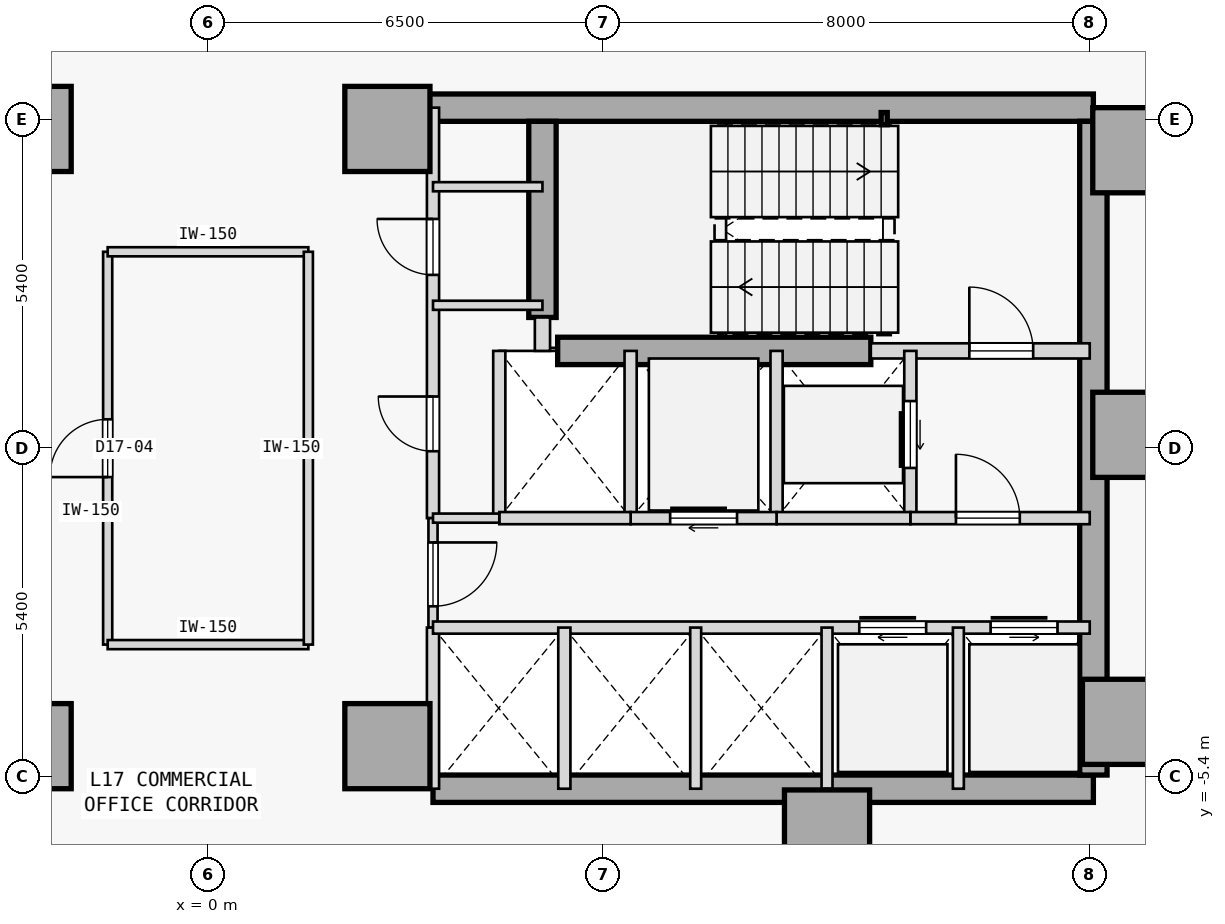
"""IFC4 building model, lengths in metres.
Left out: names, types, materials, properties, quantities, classifications, styles, units other than length and angle.
Written with IfcOpenShell. Run it as: python <this file> out.ifc"""

import sys

from ifc_helpers import new_model, si_unit, direction, frame, frame_2d, origin, origin_2d, place, context, subcontext, project, spatial, rectangle, hollow_rectangle, extrude, element, fill, save


model = new_model("IFC4")
c1 = context("Model", 3, precision=1e-05, world=origin(), true_north=direction((0.0, 1.0)))
c2 = subcontext(c1, "Body", "Model", "MODEL_VIEW")
j1 = project(units=[si_unit("LENGTHUNIT", "METRE"), si_unit("PLANEANGLEUNIT", "RADIAN")], contexts=[c1])
p1 = place(None, origin())
s1 = spatial("IfcSite", under=j1, at=p1, CompositionType="ELEMENT")
p2 = place(p1, origin())
s2 = spatial("IfcBuilding", under=s1, at=p2, CompositionType="ELEMENT")
p3 = place(p2, frame((0.0, 0.0, 71.2)))
s3 = spatial("IfcBuildingStorey", under=s2, at=p3, CompositionType="ELEMENT", Elevation=71.2)
for number, where, z_axis, x_axis in (
    (1, (-2.95, -4.9, 0.0), (0.0, 0.0, 1.0), (1.0, 0.0, 0.0)),
    (2, (-2.95, 5.25, 0.0), (0.0, 0.0, 1.0), (1.0, 0.0, 0.0)),
    (3, (15.25, 4.9, 0.0), (0.0, 0.0, 1.0), (1.0, 0.0, 0.0)),
    (4, (15.25, 0.22, 0.0), (0.0, 0.0, 1.0), (1.0, 0.0, 0.0)),
    (5, (15.08, -4.5, 0.0), (0.0, 0.0, 1.0), (1.0, 0.0, 0.0)),
    (6, (10.18, -6.32, 0.0), (0.0, 0.0, 1.0), (1.0, 0.0, 0.0)),
    (7, (2.95, -4.9, 0.0), (0.0, 0.0, 1.0), (1.0, 0.0, 0.0)),
    (8, (2.95, 5.25, 0.0), (0.0, 0.0, 1.0), (1.0, 0.0, 0.0)),
):
    element("IfcColumn", number, at=place(p3, frame(where, z_axis=z_axis, x_axis=x_axis)), inside=s3, PredefinedType="COLUMN", context=c2, shape_type="SweptSolid", body=[
        extrude(rectangle(XDim=1.4, YDim=1.4, at=origin_2d()), origin(), (0.0, 0.0, 1.0), 3.8),
    ])
p4 = place(p3, frame((3.15, 5.6, 0.0), z_axis=(0.0, 0.0, 1.0), x_axis=(1.0, 0.0, 0.0)))
e9 = element("IfcWall", 9, at=p4, inside=s3, PredefinedType="SHEAR", context=c2, shape_type="SweptSolid", body=[
    extrude(rectangle(XDim=11.41, YDim=0.45, at=frame_2d((5.705, 0.0))), origin(), (0.0, 0.0, 1.0), 3.575),
])
p5 = place(p3, frame((3.7, -5.6, 0.0), z_axis=(0.0, 0.0, 1.0), x_axis=(1.0, 0.0, 0.0)))
e10 = element("IfcWall", 10, at=p5, inside=s3, PredefinedType="SHEAR", context=c2, shape_type="SweptSolid", body=[
    extrude(rectangle(XDim=10.86, YDim=0.45, at=frame_2d((5.43, 0.0))), origin(), (0.0, 0.0, 1.0), 3.575),
])
p6 = place(p3, frame((14.56, -5.375, 0.0), z_axis=(0.0, 0.0, 1.0), x_axis=(0.0, 1.0, 0.0)))
e11 = element("IfcWall", 11, at=p6, inside=s3, PredefinedType="SHEAR", context=c2, shape_type="SweptSolid", body=[
    extrude(rectangle(XDim=10.75, YDim=0.45, at=frame_2d((5.375, 0.0))), origin(), (0.0, 0.0, 1.0), 3.575),
])
p7 = place(p3, frame((5.5, 2.15, 0.0), z_axis=(0.0, 0.0, 1.0), x_axis=(0.0, 1.0, 0.0)))
e12 = element("IfcWall", 12, at=p7, inside=s3, PredefinedType="SHEAR", context=c2, shape_type="SweptSolid", body=[
    extrude(rectangle(XDim=3.225, YDim=0.45, at=frame_2d((1.613, 0.0))), origin(), (0.0, 0.0, 1.0), 3.575),
])
p8 = place(p3, frame((5.75, 1.6, 0.0), z_axis=(0.0, 0.0, 1.0), x_axis=(1.0, 0.0, 0.0)))
e13 = element("IfcWall", 13, at=p8, inside=s3, PredefinedType="SHEAR", context=c2, shape_type="SweptSolid", body=[
    extrude(rectangle(XDim=5.15, YDim=0.45, at=frame_2d((2.575, 0.0))), origin(), (0.0, 0.0, 1.0), 3.575),
])
p9 = place(p3, frame((11.12, 5.42, 0.0), z_axis=(0.0, 0.0, 1.0), x_axis=(1.0, 0.0, 0.0)))
e14 = element("IfcColumn", 14, at=p9, inside=s3, PredefinedType="COLUMN", context=c2, shape_type="SweptSolid", body=[
    extrude(hollow_rectangle(XDim=0.1, YDim=0.2, WallThickness=0.008, at=origin_2d()), origin(), (0.0, 0.0, 1.0), 3.8),
])
p10 = place(p3, frame((10.9, 1.6, 0.0), z_axis=(0.0, 0.0, 1.0), x_axis=(1.0, 0.0, 0.0)))
e15 = element("IfcWall", 15, at=p10, inside=s3, PredefinedType="STANDARD", context=c2, shape_type="SweptSolid", body=[
    extrude(rectangle(XDim=3.6, YDim=0.25, at=frame_2d((1.8, 0.0))), origin(), (0.0, 0.0, 1.0), 3.575),
])
p11 = place(p10, frame((1.62, 0.0, 0.0)))
e16 = element("IfcOpeningElement", 16, at=p11, cuts=e15, PredefinedType="OPENING", context=c2, shape_type="SweptSolid", body=[
    extrude(rectangle(XDim=1.05, YDim=2.15, at=frame_2d((0.525, 1.075))), frame((0.0, 0.135, 0.0), z_axis=(0.0, -1.0, 0.0), x_axis=(1.0, 0.0, 0.0)), (0.0, 0.0, 1.0), 0.27),
])
p12 = place(p3, frame((5.5, 1.6, 0.0), z_axis=(0.0, 0.0, 1.0), x_axis=(0.0, 1.0, 0.0)))
e17 = element("IfcWall", 17, at=p12, inside=s3, PredefinedType="STANDARD", context=c2, shape_type="SweptSolid", body=[
    extrude(rectangle(XDim=0.55, YDim=0.25, at=frame_2d((0.275, 0.0))), origin(), (0.0, 0.0, 1.0), 3.575),
])
p13 = place(p3, frame((3.7, -1.15, 0.0), z_axis=(0.0, 0.0, 1.0), x_axis=(0.0, 1.0, 0.0)))
e18 = element("IfcWall", 18, at=p13, inside=s3, PredefinedType="STANDARD", context=c2, shape_type="SweptSolid", body=[
    extrude(rectangle(XDim=6.75, YDim=0.2, at=frame_2d((3.375, 0.0))), origin(), (0.0, 0.0, 1.0), 3.575),
])
p14 = place(p13, frame((1.1, 0.0, 0.0)))
e19 = element("IfcOpeningElement", 19, at=p14, cuts=e18, PredefinedType="OPENING", context=c2, shape_type="SweptSolid", body=[
    extrude(rectangle(XDim=0.9, YDim=2.15, at=frame_2d((0.45, 1.075))), frame((0.0, 0.11, 0.0), z_axis=(0.0, -1.0, 0.0), x_axis=(1.0, 0.0, 0.0)), (0.0, 0.0, 1.0), 0.22),
])
p15 = place(p13, frame((4.0, 0.0, 0.0)))
e20 = element("IfcOpeningElement", 20, at=p15, cuts=e18, PredefinedType="OPENING", context=c2, shape_type="SweptSolid", body=[
    extrude(rectangle(XDim=0.92, YDim=2.15, at=frame_2d((0.46, 1.075))), frame((0.0, 0.11, 0.0), z_axis=(0.0, -1.0, 0.0), x_axis=(1.0, 0.0, 0.0)), (0.0, 0.0, 1.0), 0.22),
])
p16 = place(p3, frame((3.7, -2.95, 0.0), z_axis=(0.0, 0.0, 1.0), x_axis=(0.0, 1.0, 0.0)))
e21 = element("IfcWall", 21, at=p16, inside=s3, PredefinedType="PARTITIONING", context=c2, shape_type="SweptSolid", body=[
    extrude(rectangle(XDim=1.8, YDim=0.15, at=frame_2d((0.9, 0.0))), origin(), (0.0, 0.0, 1.0), 3.575),
])
p17 = place(p16, frame((0.35, 0.0, 0.0)))
e22 = element("IfcOpeningElement", 22, at=p17, cuts=e21, PredefinedType="OPENING", context=c2, shape_type="SweptSolid", body=[
    extrude(rectangle(XDim=1.05, YDim=2.18, at=frame_2d((0.525, 1.09))), frame((0.0, 0.085, 0.0), z_axis=(0.0, -1.0, 0.0), x_axis=(1.0, 0.0, 0.0)), (0.0, 0.0, 1.0), 0.17),
])
p18 = place(p3, frame((3.7, -5.6, 0.0), z_axis=(0.0, 0.0, 1.0), x_axis=(0.0, 1.0, 0.0)))
e23 = element("IfcWall", 23, at=p18, inside=s3, PredefinedType="STANDARD", context=c2, shape_type="SweptSolid", body=[
    extrude(rectangle(XDim=2.65, YDim=0.2, at=frame_2d((1.325, 0.0))), origin(), (0.0, 0.0, 1.0), 3.575),
])
p19 = place(p3, frame((11.55, -1.15, 0.0), z_axis=(0.0, 0.0, 1.0), x_axis=(0.0, 1.0, 0.0)))
e24 = element("IfcWall", 24, at=p19, inside=s3, PredefinedType="STANDARD", context=c2, shape_type="SweptSolid", body=[
    extrude(rectangle(XDim=2.75, YDim=0.2, at=frame_2d((1.375, 0.0))), origin(), (0.0, 0.0, 1.0), 3.575),
])
p20 = place(p19, frame((0.825, 0.0, 0.0)))
e25 = element("IfcOpeningElement", 25, at=p20, cuts=e24, PredefinedType="OPENING", context=c2, shape_type="SweptSolid", body=[
    extrude(rectangle(XDim=1.1, YDim=2.15, at=frame_2d((0.55, 1.075))), frame((0.0, 0.11, 0.0), z_axis=(0.0, -1.0, 0.0), x_axis=(1.0, 0.0, 0.0)), (0.0, 0.0, 1.0), 0.22),
])
p21 = place(p3, frame((9.35, -1.15, 0.0), z_axis=(0.0, 0.0, 1.0), x_axis=(0.0, 1.0, 0.0)))
e26 = element("IfcWall", 26, at=p21, inside=s3, PredefinedType="STANDARD", context=c2, shape_type="SweptSolid", body=[
    extrude(rectangle(XDim=2.75, YDim=0.2, at=frame_2d((1.375, 0.0))), origin(), (0.0, 0.0, 1.0), 3.575),
])
p22 = place(p3, frame((11.55, -1.15, 0.0), z_axis=(0.0, 0.0, 1.0), x_axis=(1.0, 0.0, 0.0)))
e27 = element("IfcWall", 27, at=p22, inside=s3, PredefinedType="STANDARD", context=c2, shape_type="SweptSolid", body=[
    extrude(rectangle(XDim=2.95, YDim=0.2, at=frame_2d((1.475, 0.0))), origin(), (0.0, 0.0, 1.0), 3.575),
])
p23 = place(p22, frame((0.75, 0.0, 0.0)))
e28 = element("IfcOpeningElement", 28, at=p23, cuts=e27, PredefinedType="OPENING", context=c2, shape_type="SweptSolid", body=[
    extrude(rectangle(XDim=1.05, YDim=2.18, at=frame_2d((0.525, 1.09))), frame((0.0, 0.11, 0.0), z_axis=(0.0, -1.0, 0.0), x_axis=(1.0, 0.0, 0.0)), (0.0, 0.0, 1.0), 0.22),
])
p24 = place(p3, frame((9.35, -1.15, 0.0), z_axis=(0.0, 0.0, 1.0), x_axis=(1.0, 0.0, 0.0)))
e29 = element("IfcWall", 29, at=p24, inside=s3, PredefinedType="STANDARD", context=c2, shape_type="SweptSolid", body=[
    extrude(rectangle(XDim=2.2, YDim=0.2, at=frame_2d((1.1, 0.0))), origin(), (0.0, 0.0, 1.0), 3.575),
])
p25 = place(p3, frame((6.95, -1.15, 0.0), z_axis=(0.0, 0.0, 1.0), x_axis=(0.0, 1.0, 0.0)))
e30 = element("IfcWall", 30, at=p25, inside=s3, PredefinedType="STANDARD", context=c2, shape_type="SweptSolid", body=[
    extrude(rectangle(XDim=2.75, YDim=0.2, at=frame_2d((1.375, 0.0))), origin(), (0.0, 0.0, 1.0), 3.575),
])
p26 = place(p3, frame((6.95, -1.15, 0.0), z_axis=(0.0, 0.0, 1.0), x_axis=(1.0, 0.0, 0.0)))
e31 = element("IfcWall", 31, at=p26, inside=s3, PredefinedType="STANDARD", context=c2, shape_type="SweptSolid", body=[
    extrude(rectangle(XDim=2.4, YDim=0.2, at=frame_2d((1.2, 0.0))), origin(), (0.0, 0.0, 1.0), 3.575),
])
p27 = place(p26, frame((0.65, 0.0, 0.0)))
e32 = element("IfcOpeningElement", 32, at=p27, cuts=e31, PredefinedType="OPENING", context=c2, shape_type="SweptSolid", body=[
    extrude(rectangle(XDim=1.1, YDim=2.15, at=frame_2d((0.55, 1.075))), frame((0.0, 0.11, 0.0), z_axis=(0.0, -1.0, 0.0), x_axis=(1.0, 0.0, 0.0)), (0.0, 0.0, 1.0), 0.22),
])
p28 = place(p3, frame((4.79, -1.15, 0.0), z_axis=(0.0, 0.0, 1.0), x_axis=(0.0, 1.0, 0.0)))
e33 = element("IfcWall", 33, at=p28, inside=s3, PredefinedType="STANDARD", context=c2, shape_type="SweptSolid", body=[
    extrude(rectangle(XDim=2.75, YDim=0.2, at=frame_2d((1.375, 0.0))), origin(), (0.0, 0.0, 1.0), 3.575),
])
p29 = place(p3, frame((4.79, -1.15, 0.0), z_axis=(0.0, 0.0, 1.0), x_axis=(1.0, 0.0, 0.0)))
e34 = element("IfcWall", 34, at=p29, inside=s3, PredefinedType="STANDARD", context=c2, shape_type="SweptSolid", body=[
    extrude(rectangle(XDim=2.16, YDim=0.2, at=frame_2d((1.08, 0.0))), origin(), (0.0, 0.0, 1.0), 3.575),
])
p30 = place(p3, frame((3.7, -1.15, 0.0), z_axis=(0.0, 0.0, 1.0), x_axis=(1.0, 0.0, 0.0)))
e35 = element("IfcWall", 35, at=p30, inside=s3, PredefinedType="PARTITIONING", context=c2, shape_type="SweptSolid", body=[
    extrude(rectangle(XDim=1.09, YDim=0.15, at=frame_2d((0.545, 0.0))), origin(), (0.0, 0.0, 1.0), 3.575),
])
p31 = place(p3, frame((3.7, -2.95, 0.0), z_axis=(0.0, 0.0, 1.0), x_axis=(1.0, 0.0, 0.0)))
e36 = element("IfcWall", 36, at=p31, inside=s3, PredefinedType="STANDARD", context=c2, shape_type="SweptSolid", body=[
    extrude(rectangle(XDim=10.8, YDim=0.2, at=frame_2d((5.4, 0.0))), origin(), (0.0, 0.0, 1.0), 3.575),
])
p32 = place(p31, frame((7.01, 0.0, 0.0)))
e37 = element("IfcOpeningElement", 37, at=p32, cuts=e36, PredefinedType="OPENING", context=c2, shape_type="SweptSolid", body=[
    extrude(rectangle(XDim=1.1, YDim=2.15, at=frame_2d((0.55, 1.075))), frame((0.0, 0.11, 0.0), z_axis=(0.0, -1.0, 0.0), x_axis=(1.0, 0.0, 0.0)), (0.0, 0.0, 1.0), 0.22),
])
p33 = place(p31, frame((9.17, 0.0, 0.0)))
e38 = element("IfcOpeningElement", 38, at=p33, cuts=e36, PredefinedType="OPENING", context=c2, shape_type="SweptSolid", body=[
    extrude(rectangle(XDim=1.1, YDim=2.15, at=frame_2d((0.55, 1.075))), frame((0.0, 0.11, 0.0), z_axis=(0.0, -1.0, 0.0), x_axis=(1.0, 0.0, 0.0)), (0.0, 0.0, 1.0), 0.22),
])
p34 = place(p3, frame((5.86, -5.6, 0.0), z_axis=(0.0, 0.0, 1.0), x_axis=(0.0, 1.0, 0.0)))
e39 = element("IfcWall", 39, at=p34, inside=s3, PredefinedType="STANDARD", context=c2, shape_type="SweptSolid", body=[
    extrude(rectangle(XDim=2.65, YDim=0.2, at=frame_2d((1.325, 0.0))), origin(), (0.0, 0.0, 1.0), 3.575),
])
for number, where, z_axis, x_axis in (
    (40, (12.34, -5.6, 0.0), (0.0, 0.0, 1.0), (0.0, 1.0, 0.0)),
    (41, (10.18, -5.6, 0.0), (0.0, 0.0, 1.0), (0.0, 1.0, 0.0)),
    (42, (8.02, -5.6, 0.0), (0.0, 0.0, 1.0), (0.0, 1.0, 0.0)),
):
    element("IfcWall", number, at=place(p3, frame(where, z_axis=z_axis, x_axis=x_axis)), inside=s3, PredefinedType="STANDARD", context=c2, shape_type="SweptSolid", body=[
        extrude(rectangle(XDim=2.65, YDim=0.18, at=frame_2d((1.325, 0.0))), origin(), (0.0, 0.0, 1.0), 3.575),
    ])
for number, where, z_axis, x_axis in (
    (43, (3.7, 4.3, 0.0), (0.0, 0.0, 1.0), (1.0, 0.0, 0.0)),
    (44, (3.7, 2.35, 0.0), (0.0, 0.0, 1.0), (1.0, 0.0, 0.0)),
):
    element("IfcWall", number, at=place(p3, frame(where, z_axis=z_axis, x_axis=x_axis)), inside=s3, PredefinedType="PARTITIONING", context=c2, shape_type="SweptSolid", body=[
        extrude(rectangle(XDim=1.8, YDim=0.15, at=frame_2d((0.9, 0.0))), origin(), (0.0, 0.0, 1.0), 3.575),
    ])
p35 = place(p3, frame((-1.65, -3.23, 0.0), z_axis=(0.0, 0.0, 1.0), x_axis=(0.0, 1.0, 0.0)))
e45 = element("IfcWall", 45, at=p35, inside=s3, PredefinedType="PARTITIONING", context=c2, shape_type="SweptSolid", body=[
    extrude(rectangle(XDim=6.46, YDim=0.15, at=frame_2d((3.23, 0.0))), origin(), (0.0, 0.0, 1.0), 3.575),
])
p36 = place(p35, frame((2.755, 0.0, 0.0)))
e46 = element("IfcOpeningElement", 46, at=p36, cuts=e45, PredefinedType="OPENING", context=c2, shape_type="SweptSolid", body=[
    extrude(rectangle(XDim=0.95, YDim=2.15, at=frame_2d((0.475, 1.075))), frame((0.0, 0.085, 0.0), z_axis=(0.0, -1.0, 0.0), x_axis=(1.0, 0.0, 0.0)), (0.0, 0.0, 1.0), 0.17),
])
for number, where, z_axis, x_axis in (
    (47, (-1.65, -3.23, 0.0), (0.0, 0.0, 1.0), (1.0, 0.0, 0.0)),
    (48, (-1.65, 3.23, 0.0), (0.0, 0.0, 1.0), (1.0, 0.0, 0.0)),
):
    element("IfcWall", number, at=place(p3, frame(where, z_axis=z_axis, x_axis=x_axis)), inside=s3, PredefinedType="PARTITIONING", context=c2, shape_type="SweptSolid", body=[
        extrude(rectangle(XDim=3.3, YDim=0.15, at=frame_2d((1.65, 0.0))), origin(), (0.0, 0.0, 1.0), 3.575),
    ])
p37 = place(p3, frame((1.65, -3.23, 0.0), z_axis=(0.0, 0.0, 1.0), x_axis=(0.0, 1.0, 0.0)))
e49 = element("IfcWall", 49, at=p37, inside=s3, PredefinedType="PARTITIONING", context=c2, shape_type="SweptSolid", body=[
    extrude(rectangle(XDim=6.46, YDim=0.15, at=frame_2d((3.23, 0.0))), origin(), (0.0, 0.0, 1.0), 3.575),
])
p38 = place(p11, origin())
e50 = element("IfcDoor", 50, at=p38, inside=s3, OperationType="SINGLE_SWING_LEFT", PredefinedType="DOOR", context=c2, shape_type="SweptSolid", body=[
    extrude(rectangle(XDim=1.05, YDim=2.15, at=frame_2d((0.525, 1.075))), frame((0.0, 0.025, 0.0), z_axis=(0.0, -1.0, 0.0), x_axis=(1.0, 0.0, 0.0)), (0.0, 0.0, 1.0), 0.05),
])
fill(e16, e50)
p39 = place(p23, origin())
e51 = element("IfcDoor", 51, at=p39, inside=s3, OperationType="SINGLE_SWING_LEFT", PredefinedType="DOOR", context=c2, shape_type="SweptSolid", body=[
    extrude(rectangle(XDim=1.05, YDim=2.18, at=frame_2d((0.525, 1.09))), frame((0.0, 0.025, 0.0), z_axis=(0.0, -1.0, 0.0), x_axis=(1.0, 0.0, 0.0)), (0.0, 0.0, 1.0), 0.05),
])
fill(e28, e51)
p40 = place(p17, frame((1.05, 0.0, 0.0), z_axis=(0.0, 0.0, 1.0), x_axis=(-1.0, 0.0, 0.0)))
e52 = element("IfcDoor", 52, at=p40, inside=s3, OperationType="SINGLE_SWING_RIGHT", PredefinedType="DOOR", context=c2, shape_type="SweptSolid", body=[
    extrude(rectangle(XDim=1.05, YDim=2.18, at=frame_2d((0.525, 1.09))), frame((0.0, 0.025, 0.0), z_axis=(0.0, -1.0, 0.0), x_axis=(1.0, 0.0, 0.0)), (0.0, 0.0, 1.0), 0.05),
])
fill(e22, e52)
p41 = place(p20, origin())
e53 = element("IfcDoor", 53, at=p41, inside=s3, OperationType="SLIDING_TO_RIGHT", PredefinedType="DOOR", context=c2, shape_type="SweptSolid", body=[
    extrude(rectangle(XDim=1.1, YDim=2.15, at=frame_2d((0.55, 1.075))), frame((0.0, 0.025, 0.0), z_axis=(0.0, -1.0, 0.0), x_axis=(1.0, 0.0, 0.0)), (0.0, 0.0, 1.0), 0.05),
])
fill(e25, e53)
p42 = place(p27, origin())
e54 = element("IfcDoor", 54, at=p42, inside=s3, OperationType="SLIDING_TO_RIGHT", PredefinedType="DOOR", context=c2, shape_type="SweptSolid", body=[
    extrude(rectangle(XDim=1.1, YDim=2.15, at=frame_2d((0.55, 1.075))), frame((0.0, 0.025, 0.0), z_axis=(0.0, -1.0, 0.0), x_axis=(1.0, 0.0, 0.0)), (0.0, 0.0, 1.0), 0.05),
])
fill(e32, e54)
p43 = place(p32, origin())
e55 = element("IfcDoor", 55, at=p43, inside=s3, OperationType="SLIDING_TO_RIGHT", PredefinedType="DOOR", context=c2, shape_type="SweptSolid", body=[
    extrude(rectangle(XDim=1.1, YDim=2.15, at=frame_2d((0.55, 1.075))), frame((0.0, 0.025, 0.0), z_axis=(0.0, -1.0, 0.0), x_axis=(1.0, 0.0, 0.0)), (0.0, 0.0, 1.0), 0.05),
])
fill(e37, e55)
p44 = place(p33, origin())
e56 = element("IfcDoor", 56, at=p44, inside=s3, OperationType="SLIDING_TO_LEFT", PredefinedType="DOOR", context=c2, shape_type="SweptSolid", body=[
    extrude(rectangle(XDim=1.1, YDim=2.15, at=frame_2d((0.55, 1.075))), frame((0.0, 0.025, 0.0), z_axis=(0.0, -1.0, 0.0), x_axis=(1.0, 0.0, 0.0)), (0.0, 0.0, 1.0), 0.05),
])
fill(e38, e56)
p45 = place(p14, origin())
e57 = element("IfcDoor", 57, at=p45, inside=s3, OperationType="SINGLE_SWING_RIGHT", PredefinedType="DOOR", context=c2, shape_type="SweptSolid", body=[
    extrude(rectangle(XDim=0.9, YDim=2.15, at=frame_2d((0.45, 1.075))), frame((0.0, 0.025, 0.0), z_axis=(0.0, -1.0, 0.0), x_axis=(1.0, 0.0, 0.0)), (0.0, 0.0, 1.0), 0.05),
])
fill(e19, e57)
p46 = place(p15, origin())
e58 = element("IfcDoor", 58, at=p46, inside=s3, OperationType="SINGLE_SWING_RIGHT", PredefinedType="DOOR", context=c2, shape_type="SweptSolid", body=[
    extrude(rectangle(XDim=0.92, YDim=2.15, at=frame_2d((0.46, 1.075))), frame((0.0, 0.025, 0.0), z_axis=(0.0, -1.0, 0.0), x_axis=(1.0, 0.0, 0.0)), (0.0, 0.0, 1.0), 0.05),
])
fill(e20, e58)
p47 = place(p36, origin())
e59 = element("IfcDoor", 59, at=p47, inside=s3, OperationType="SINGLE_SWING_LEFT", PredefinedType="DOOR", context=c2, shape_type="SweptSolid", body=[
    extrude(rectangle(XDim=0.95, YDim=2.15, at=frame_2d((0.475, 1.075))), frame((0.0, 0.025, 0.0), z_axis=(0.0, -1.0, 0.0), x_axis=(1.0, 0.0, 0.0)), (0.0, 0.0, 1.0), 0.05),
])
fill(e46, e59)
save(model, sys.argv[1])
